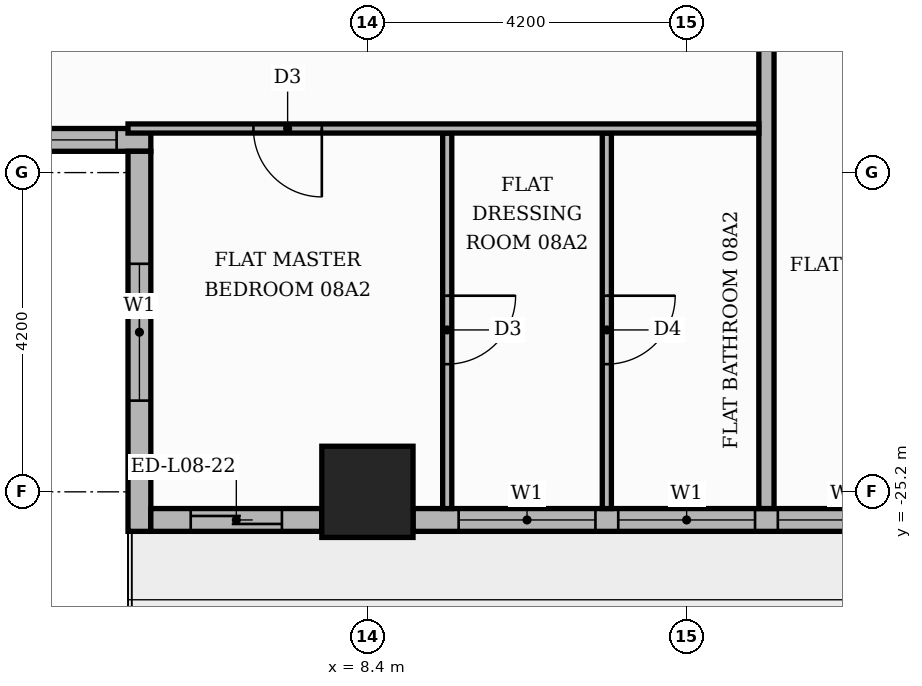
"""IFC4 building model, lengths in metres.
Left out: names, types, materials, properties, quantities, classifications, styles, units other than length and angle.
Written with IfcOpenShell. Run it as: python <this file> out.ifc"""

import sys

from ifc_helpers import new_model, si_unit, direction, frame, frame_2d, origin, origin_2d, place, context, subcontext, project, spatial, rectangle, extrude, element, fill, save


model = new_model("IFC4")
c1 = context("Model", 3, precision=1e-05, world=origin(), true_north=direction((0.0, 1.0)))
c2 = subcontext(c1, "Body", "Model", "MODEL_VIEW")
j1 = project(units=[si_unit("LENGTHUNIT", "METRE"), si_unit("PLANEANGLEUNIT", "RADIAN")], contexts=[c1])
p1 = place(None, origin())
s1 = spatial("IfcSite", under=j1, at=p1, CompositionType="ELEMENT")
p2 = place(p1, origin())
s2 = spatial("IfcBuilding", under=s1, at=p2, CompositionType="ELEMENT")
p3 = place(p2, frame((0.0, 0.0, 38.7)))
s3 = spatial("IfcBuildingStorey", under=s2, at=p3, CompositionType="ELEMENT", Elevation=38.7)
p4 = place(p3, frame((8.4, -25.2, 0.0), z_axis=(0.0, 0.0, 1.0), x_axis=(1.0, 0.0, 0.0)))
e1 = element("IfcColumn", 1, at=p4, inside=s3, PredefinedType="COLUMN", context=c2, shape_type="SweptSolid", body=[
    extrude(rectangle(XDim=1.2, YDim=1.2, at=origin_2d()), origin(), (0.0, 0.0, 1.0), 3.9),
])
p5 = place(p3, frame((-5.25, -20.57, 0.0), z_axis=(0.0, 0.0, 1.0), x_axis=(1.0, 0.0, 0.0)))
e2 = element("IfcWall", 2, at=p5, inside=s3, PredefinedType="STANDARD", context=c2, shape_type="SweptSolid", body=[
    extrude(rectangle(XDim=10.8, YDim=0.3, at=frame_2d((5.4, 0.0))), origin(), (0.0, 0.0, 1.0), 3.48),
])
p6 = place(p5, frame((0.15, 0.0, 0.9)))
e3 = element("IfcOpeningElement", 3, at=p6, cuts=e2, PredefinedType="OPENING", context=c2, shape_type="SweptSolid", body=[
    extrude(rectangle(XDim=6.0, YDim=2.1, at=frame_2d((3.0, 1.05))), frame((0.0, 0.16, 0.0), z_axis=(0.0, -1.0, 0.0), x_axis=(1.0, 0.0, 0.0)), (0.0, 0.0, 1.0), 0.32),
])
p7 = place(p5, frame((6.45, 0.0, 0.9)))
e4 = element("IfcOpeningElement", 4, at=p7, cuts=e2, PredefinedType="OPENING", context=c2, shape_type="SweptSolid", body=[
    extrude(rectangle(XDim=3.9, YDim=2.1, at=frame_2d((1.95, 1.05))), frame((0.0, 0.16, 0.0), z_axis=(0.0, -1.0, 0.0), x_axis=(1.0, 0.0, 0.0)), (0.0, 0.0, 1.0), 0.32),
])
p8 = place(p3, frame((5.4, -20.72, 0.0), z_axis=(0.0, 0.0, 1.0), x_axis=(0.0, -1.0, 0.0)))
e5 = element("IfcWall", 5, at=p8, inside=s3, PredefinedType="STANDARD", context=c2, shape_type="SweptSolid", body=[
    extrude(rectangle(XDim=5.0, YDim=0.3, at=frame_2d((2.5, 0.0))), origin(), (0.0, 0.0, 1.0), 3.48),
])
p9 = place(p8, frame((1.48, 0.0, 0.9)))
e6 = element("IfcOpeningElement", 6, at=p9, cuts=e5, PredefinedType="OPENING", context=c2, shape_type="SweptSolid", body=[
    extrude(rectangle(XDim=1.8, YDim=2.1, at=frame_2d((0.9, 1.05))), frame((0.0, 0.16, 0.0), z_axis=(0.0, -1.0, 0.0), x_axis=(1.0, 0.0, 0.0)), (0.0, 0.0, 1.0), 0.32),
])
p10 = place(p3, frame((5.55, -25.57, 0.0), z_axis=(0.0, 0.0, 1.0), x_axis=(1.0, 0.0, 0.0)))
e7 = element("IfcWall", 7, at=p10, inside=s3, PredefinedType="STANDARD", context=c2, shape_type="SweptSolid", body=[
    extrude(rectangle(XDim=2.25, YDim=0.3, at=frame_2d((1.125, 0.0))), origin(), (0.0, 0.0, 1.0), 3.48),
])
p11 = place(p10, frame((0.525, 0.0, 0.0)))
e8 = element("IfcOpeningElement", 8, at=p11, cuts=e7, PredefinedType="OPENING", context=c2, shape_type="SweptSolid", body=[
    extrude(rectangle(XDim=1.2, YDim=2.4, at=frame_2d((0.6, 1.2))), frame((0.0, 0.16, 0.0), z_axis=(0.0, -1.0, 0.0), x_axis=(1.0, 0.0, 0.0)), (0.0, 0.0, 1.0), 0.32),
])
p12 = place(p3, frame((9.0, -25.57, 0.0), z_axis=(0.0, 0.0, 1.0), x_axis=(1.0, 0.0, 0.0)))
e9 = element("IfcWall", 9, at=p12, inside=s3, PredefinedType="STANDARD", context=c2, shape_type="SweptSolid", body=[
    extrude(rectangle(XDim=7.2, YDim=0.3, at=frame_2d((3.6, 0.0))), origin(), (0.0, 0.0, 1.0), 3.48),
])
p13 = place(p12, frame((0.6, 0.0, 0.9)))
e10 = element("IfcOpeningElement", 10, at=p13, cuts=e9, PredefinedType="OPENING", context=c2, shape_type="SweptSolid", body=[
    extrude(rectangle(XDim=1.8, YDim=2.1, at=frame_2d((0.9, 1.05))), frame((0.0, 0.16, 0.0), z_axis=(0.0, -1.0, 0.0), x_axis=(1.0, 0.0, 0.0)), (0.0, 0.0, 1.0), 0.32),
])
p14 = place(p12, frame((2.7, 0.0, 0.9)))
e11 = element("IfcOpeningElement", 11, at=p14, cuts=e9, PredefinedType="OPENING", context=c2, shape_type="SweptSolid", body=[
    extrude(rectangle(XDim=1.8, YDim=2.1, at=frame_2d((0.9, 1.05))), frame((0.0, 0.16, 0.0), z_axis=(0.0, -1.0, 0.0), x_axis=(1.0, 0.0, 0.0)), (0.0, 0.0, 1.0), 0.32),
])
p15 = place(p12, frame((4.8, 0.0, 0.9)))
e12 = element("IfcOpeningElement", 12, at=p15, cuts=e9, PredefinedType="OPENING", context=c2, shape_type="SweptSolid", body=[
    extrude(rectangle(XDim=1.8, YDim=2.1, at=frame_2d((0.9, 1.05))), frame((0.0, 0.16, 0.0), z_axis=(0.0, -1.0, 0.0), x_axis=(1.0, 0.0, 0.0)), (0.0, 0.0, 1.0), 0.32),
])
p16 = place(p3, frame((9.45, -25.42, 0.0), z_axis=(0.0, 0.0, 1.0), x_axis=(0.0, 1.0, 0.0)))
e13 = element("IfcWall", 13, at=p16, inside=s3, PredefinedType="PARTITIONING", context=c2, shape_type="SweptSolid", body=[
    extrude(rectangle(XDim=4.94, YDim=0.12, at=frame_2d((2.47, 0.0))), origin(), (0.0, 0.0, 1.0), 3.48),
])
p17 = place(p16, frame((1.9, 0.0, 0.0)))
e14 = element("IfcOpeningElement", 14, at=p17, cuts=e13, PredefinedType="OPENING", context=c2, shape_type="SweptSolid", body=[
    extrude(rectangle(XDim=0.9, YDim=2.1, at=frame_2d((0.45, 1.05))), frame((0.0, 0.07, 0.0), z_axis=(0.0, -1.0, 0.0), x_axis=(1.0, 0.0, 0.0)), (0.0, 0.0, 1.0), 0.14),
])
p18 = place(p3, frame((11.55, -25.42, 0.0), z_axis=(0.0, 0.0, 1.0), x_axis=(0.0, 1.0, 0.0)))
e15 = element("IfcWall", 15, at=p18, inside=s3, PredefinedType="PARTITIONING", context=c2, shape_type="SweptSolid", body=[
    extrude(rectangle(XDim=4.94, YDim=0.12, at=frame_2d((2.47, 0.0))), origin(), (0.0, 0.0, 1.0), 3.48),
])
p19 = place(p18, frame((1.9, 0.0, 0.0)))
e16 = element("IfcOpeningElement", 16, at=p19, cuts=e15, PredefinedType="OPENING", context=c2, shape_type="SweptSolid", body=[
    extrude(rectangle(XDim=0.9, YDim=2.1, at=frame_2d((0.45, 1.05))), frame((0.0, 0.07, 0.0), z_axis=(0.0, -1.0, 0.0), x_axis=(1.0, 0.0, 0.0)), (0.0, 0.0, 1.0), 0.14),
])
p20 = place(p3, frame((13.65, -25.42, 0.0), z_axis=(0.0, 0.0, 1.0), x_axis=(0.0, 1.0, 0.0)))
e17 = element("IfcWall", 17, at=p20, inside=s3, PredefinedType="PARTITIONING", context=c2, shape_type="SweptSolid", body=[
    extrude(rectangle(XDim=11.67, YDim=0.2, at=frame_2d((5.835, 0.0))), origin(), (0.0, 0.0, 1.0), 3.48),
])
p21 = place(p3, frame((5.25, -20.42, 0.0), z_axis=(0.0, 0.0, 1.0), x_axis=(1.0, 0.0, 0.0)))
e18 = element("IfcWall", 18, at=p21, inside=s3, PredefinedType="PARTITIONING", context=c2, shape_type="SweptSolid", body=[
    extrude(rectangle(XDim=8.3, YDim=0.12, at=frame_2d((4.15, 0.0))), origin(), (0.0, 0.0, 1.0), 3.48),
])
p22 = place(p21, frame((1.65, 0.0, 0.0)))
e19 = element("IfcOpeningElement", 19, at=p22, cuts=e18, PredefinedType="OPENING", context=c2, shape_type="SweptSolid", body=[
    extrude(rectangle(XDim=0.9, YDim=2.1, at=frame_2d((0.45, 1.05))), frame((0.0, 0.07, 0.0), z_axis=(0.0, -1.0, 0.0), x_axis=(1.0, 0.0, 0.0)), (0.0, 0.0, 1.0), 0.14),
])
p23 = place(p7, origin())
e20 = element("IfcWindow", 20, at=p23, inside=s3, PartitioningType="SINGLE_PANEL", PredefinedType="WINDOW", context=c2, shape_type="SweptSolid", body=[
    extrude(rectangle(XDim=3.9, YDim=2.1, at=frame_2d((1.95, 1.05))), frame((0.0, 0.03, 0.0), z_axis=(0.0, -1.0, 0.0), x_axis=(1.0, 0.0, 0.0)), (0.0, 0.0, 1.0), 0.06),
])
fill(e4, e20)
p24 = place(p9, origin())
e21 = element("IfcWindow", 21, at=p24, inside=s3, PartitioningType="SINGLE_PANEL", PredefinedType="WINDOW", context=c2, shape_type="SweptSolid", body=[
    extrude(rectangle(XDim=1.8, YDim=2.1, at=frame_2d((0.9, 1.05))), frame((0.0, 0.03, 0.0), z_axis=(0.0, -1.0, 0.0), x_axis=(1.0, 0.0, 0.0)), (0.0, 0.0, 1.0), 0.06),
])
fill(e6, e21)
p25 = place(p11, origin())
e22 = element("IfcDoor", 22, at=p25, inside=s3, OperationType="SLIDING_TO_RIGHT", PredefinedType="DOOR", context=c2, shape_type="SweptSolid", body=[
    extrude(rectangle(XDim=1.2, YDim=2.4, at=frame_2d((0.6, 1.2))), frame((0.0, 0.025, 0.0), z_axis=(0.0, -1.0, 0.0), x_axis=(1.0, 0.0, 0.0)), (0.0, 0.0, 1.0), 0.05),
])
fill(e8, e22)
p26 = place(p13, origin())
e23 = element("IfcWindow", 23, at=p26, inside=s3, PartitioningType="SINGLE_PANEL", PredefinedType="WINDOW", context=c2, shape_type="SweptSolid", body=[
    extrude(rectangle(XDim=1.8, YDim=2.1, at=frame_2d((0.9, 1.05))), frame((0.0, 0.03, 0.0), z_axis=(0.0, -1.0, 0.0), x_axis=(1.0, 0.0, 0.0)), (0.0, 0.0, 1.0), 0.06),
])
fill(e10, e23)
p27 = place(p14, origin())
e24 = element("IfcWindow", 24, at=p27, inside=s3, PartitioningType="SINGLE_PANEL", PredefinedType="WINDOW", context=c2, shape_type="SweptSolid", body=[
    extrude(rectangle(XDim=1.8, YDim=2.1, at=frame_2d((0.9, 1.05))), frame((0.0, 0.03, 0.0), z_axis=(0.0, -1.0, 0.0), x_axis=(1.0, 0.0, 0.0)), (0.0, 0.0, 1.0), 0.06),
])
fill(e11, e24)
p28 = place(p15, origin())
e25 = element("IfcWindow", 25, at=p28, inside=s3, PartitioningType="SINGLE_PANEL", PredefinedType="WINDOW", context=c2, shape_type="SweptSolid", body=[
    extrude(rectangle(XDim=1.8, YDim=2.1, at=frame_2d((0.9, 1.05))), frame((0.0, 0.03, 0.0), z_axis=(0.0, -1.0, 0.0), x_axis=(1.0, 0.0, 0.0)), (0.0, 0.0, 1.0), 0.06),
])
fill(e12, e25)
p29 = place(p22, frame((0.9, 0.0, 0.0), z_axis=(0.0, 0.0, 1.0), x_axis=(-1.0, 0.0, 0.0)))
e26 = element("IfcDoor", 26, at=p29, inside=s3, OperationType="SINGLE_SWING_RIGHT", PredefinedType="DOOR", context=c2, shape_type="SweptSolid", body=[
    extrude(rectangle(XDim=0.9, YDim=2.1, at=frame_2d((0.45, 1.05))), frame((0.0, 0.025, 0.0), z_axis=(0.0, -1.0, 0.0), x_axis=(1.0, 0.0, 0.0)), (0.0, 0.0, 1.0), 0.05),
])
fill(e19, e26)
p30 = place(p17, frame((0.9, 0.0, 0.0), z_axis=(0.0, 0.0, 1.0), x_axis=(-1.0, 0.0, 0.0)))
e27 = element("IfcDoor", 27, at=p30, inside=s3, OperationType="SINGLE_SWING_RIGHT", PredefinedType="DOOR", context=c2, shape_type="SweptSolid", body=[
    extrude(rectangle(XDim=0.9, YDim=2.1, at=frame_2d((0.45, 1.05))), frame((0.0, 0.025, 0.0), z_axis=(0.0, -1.0, 0.0), x_axis=(1.0, 0.0, 0.0)), (0.0, 0.0, 1.0), 0.05),
])
fill(e14, e27)
p31 = place(p19, frame((0.9, 0.0, 0.0), z_axis=(0.0, 0.0, 1.0), x_axis=(-1.0, 0.0, 0.0)))
e28 = element("IfcDoor", 28, at=p31, inside=s3, OperationType="SINGLE_SWING_RIGHT", PredefinedType="DOOR", context=c2, shape_type="SweptSolid", body=[
    extrude(rectangle(XDim=0.9, YDim=2.1, at=frame_2d((0.45, 1.05))), frame((0.0, 0.025, 0.0), z_axis=(0.0, -1.0, 0.0), x_axis=(1.0, 0.0, 0.0)), (0.0, 0.0, 1.0), 0.05),
])
fill(e16, e28)
save(model, sys.argv[1])
